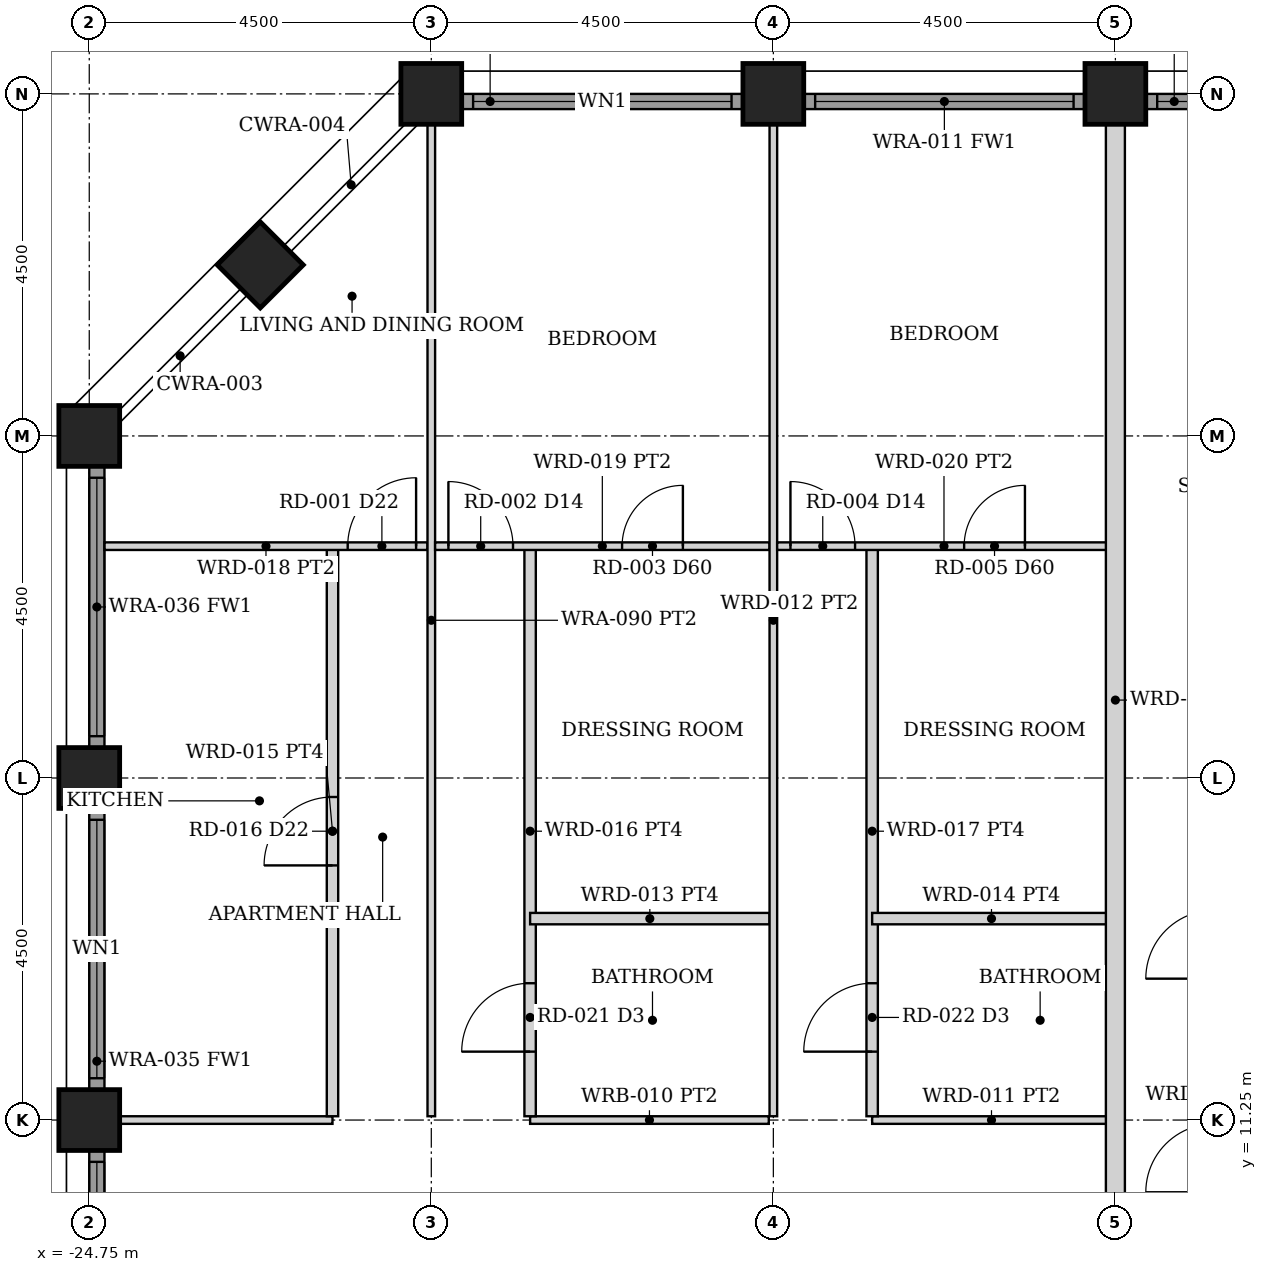
"""IFC4 building model, lengths in metres.
Left out: names, types, materials, properties, quantities, classifications, styles, units other than length and angle.
Written with IfcOpenShell. Run it as: python <this file> out.ifc"""

import sys

from ifc_helpers import new_model, si_unit, direction, frame, frame_2d, origin, origin_2d, place, context, subcontext, project, spatial, rectangle, hollow_rectangle, extrude, element, fill, save


model = new_model("IFC4")
c1 = context("Model", 3, precision=1e-05, world=origin(), true_north=direction((0.0, 1.0)))
c2 = subcontext(c1, "Body", "Model", "MODEL_VIEW")
j1 = project(units=[si_unit("LENGTHUNIT", "METRE"), si_unit("PLANEANGLEUNIT", "RADIAN")], contexts=[c1])
p1 = place(None, origin())
s1 = spatial("IfcSite", under=j1, at=p1, CompositionType="ELEMENT")
p2 = place(p1, origin())
s2 = spatial("IfcBuilding", under=s1, at=p2, CompositionType="ELEMENT")
p3 = place(p2, frame((0.0, 0.0, 58.0)))
s3 = spatial("IfcBuildingStorey", under=s2, at=p3, CompositionType="ELEMENT", Elevation=58.0)
for number, where, z_axis, x_axis in (
    (1, (-20.25, 24.75, 0.0), (0.0, 0.0, 1.0), (0.0, 1.0, 0.0)),
    (2, (-15.75, 24.75, 0.0), (0.0, 0.0, 1.0), (0.0, 1.0, 0.0)),
    (3, (-11.25, 24.75, 0.0), (0.0, 0.0, 1.0), (0.0, 1.0, 0.0)),
    (4, (-24.75, 11.25, 0.0), (0.0, 0.0, 1.0), (1.0, 0.0, 0.0)),
    (5, (-24.75, 15.75, 0.0), (0.0, 0.0, 1.0), (1.0, 0.0, 0.0)),
    (6, (-24.75, 20.25, 0.0), (0.0, 0.0, 1.0), (1.0, 0.0, 0.0)),
    (7, (-22.5, 22.5, 0.0), (0.0, 0.0, 1.0), (0.707, -0.707, 0.0)),
):
    element("IfcColumn", number, at=place(p3, frame(where, z_axis=z_axis, x_axis=x_axis)), inside=s3, PredefinedType="COLUMN", context=c2, shape_type="SweptSolid", body=[
        extrude(hollow_rectangle(XDim=0.8, YDim=0.8, WallThickness=0.06, at=origin_2d()), origin(), (0.0, 0.0, 1.0), 3.5),
    ])
p4 = place(p3, frame((-19.845, 24.65, 0.0), z_axis=(0.0, 0.0, 1.0), x_axis=(1.0, 0.0, 0.0)))
e8 = element("IfcWall", 8, at=p4, inside=s3, PredefinedType="SOLIDWALL", context=c2, shape_type="SweptSolid", body=[
    extrude(rectangle(XDim=3.69, YDim=0.2, at=frame_2d((1.845, 0.0))), origin(), (0.0, 0.0, 1.0), 2.379),
])
p5 = place(p4, frame((0.145, 0.0, 0.3)))
e9 = element("IfcOpeningElement", 9, at=p5, cuts=e8, PredefinedType="OPENING", context=c2, shape_type="SweptSolid", body=[
    extrude(rectangle(XDim=3.4, YDim=1.929, at=frame_2d((1.7, 0.964))), frame((0.0, 0.11, 0.0), z_axis=(0.0, -1.0, 0.0), x_axis=(1.0, 0.0, 0.0)), (0.0, 0.0, 1.0), 0.22),
])
p6 = place(p3, frame((-15.345, 24.65, 0.0), z_axis=(0.0, 0.0, 1.0), x_axis=(1.0, 0.0, 0.0)))
e10 = element("IfcWall", 10, at=p6, inside=s3, PredefinedType="SOLIDWALL", context=c2, shape_type="SweptSolid", body=[
    extrude(rectangle(XDim=3.69, YDim=0.2, at=frame_2d((1.845, 0.0))), origin(), (0.0, 0.0, 1.0), 2.379),
])
p7 = place(p6, frame((0.145, 0.0, 0.3)))
e11 = element("IfcOpeningElement", 11, at=p7, cuts=e10, PredefinedType="OPENING", context=c2, shape_type="SweptSolid", body=[
    extrude(rectangle(XDim=3.4, YDim=1.929, at=frame_2d((1.7, 0.964))), frame((0.0, 0.11, 0.0), z_axis=(0.0, -1.0, 0.0), x_axis=(1.0, 0.0, 0.0)), (0.0, 0.0, 1.0), 0.22),
])
p8 = place(p3, frame((-10.845, 24.65, 0.0), z_axis=(0.0, 0.0, 1.0), x_axis=(1.0, 0.0, 0.0)))
e12 = element("IfcWall", 12, at=p8, inside=s3, PredefinedType="SOLIDWALL", context=c2, shape_type="SweptSolid", body=[
    extrude(rectangle(XDim=3.69, YDim=0.2, at=frame_2d((1.845, 0.0))), origin(), (0.0, 0.0, 1.0), 2.379),
])
p9 = place(p8, frame((0.145, 0.0, 0.3)))
e13 = element("IfcOpeningElement", 13, at=p9, cuts=e12, PredefinedType="OPENING", context=c2, shape_type="SweptSolid", body=[
    extrude(rectangle(XDim=3.4, YDim=1.929, at=frame_2d((1.7, 0.964))), frame((0.0, 0.11, 0.0), z_axis=(0.0, -1.0, 0.0), x_axis=(1.0, 0.0, 0.0)), (0.0, 0.0, 1.0), 0.22),
])
p10 = place(p3, frame((-24.65, 7.155, 0.0), z_axis=(0.0, 0.0, 1.0), x_axis=(0.0, 1.0, 0.0)))
e14 = element("IfcWall", 14, at=p10, inside=s3, PredefinedType="SOLIDWALL", context=c2, shape_type="SweptSolid", body=[
    extrude(rectangle(XDim=3.69, YDim=0.2, at=frame_2d((1.845, 0.0))), origin(), (0.0, 0.0, 1.0), 2.379),
])
p11 = place(p10, frame((0.145, 0.0, 0.3)))
e15 = element("IfcOpeningElement", 15, at=p11, cuts=e14, PredefinedType="OPENING", context=c2, shape_type="SweptSolid", body=[
    extrude(rectangle(XDim=3.4, YDim=1.929, at=frame_2d((1.7, 0.964))), frame((0.0, 0.11, 0.0), z_axis=(0.0, -1.0, 0.0), x_axis=(1.0, 0.0, 0.0)), (0.0, 0.0, 1.0), 0.22),
])
p12 = place(p3, frame((-24.65, 11.655, 0.0), z_axis=(0.0, 0.0, 1.0), x_axis=(0.0, 1.0, 0.0)))
e16 = element("IfcWall", 16, at=p12, inside=s3, PredefinedType="SOLIDWALL", context=c2, shape_type="SweptSolid", body=[
    extrude(rectangle(XDim=3.69, YDim=0.2, at=frame_2d((1.845, 0.0))), origin(), (0.0, 0.0, 1.0), 2.379),
])
p13 = place(p12, frame((0.145, 0.0, 0.3)))
e17 = element("IfcOpeningElement", 17, at=p13, cuts=e16, PredefinedType="OPENING", context=c2, shape_type="SweptSolid", body=[
    extrude(rectangle(XDim=3.4, YDim=1.929, at=frame_2d((1.7, 0.964))), frame((0.0, 0.11, 0.0), z_axis=(0.0, -1.0, 0.0), x_axis=(1.0, 0.0, 0.0)), (0.0, 0.0, 1.0), 0.22),
])
p14 = place(p3, frame((-24.65, 16.155, 0.0), z_axis=(0.0, 0.0, 1.0), x_axis=(0.0, 1.0, 0.0)))
e18 = element("IfcWall", 18, at=p14, inside=s3, PredefinedType="SOLIDWALL", context=c2, shape_type="SweptSolid", body=[
    extrude(rectangle(XDim=3.69, YDim=0.2, at=frame_2d((1.845, 0.0))), origin(), (0.0, 0.0, 1.0), 2.379),
])
p15 = place(p14, frame((0.145, 0.0, 0.3)))
e19 = element("IfcOpeningElement", 19, at=p15, cuts=e18, PredefinedType="OPENING", context=c2, shape_type="SweptSolid", body=[
    extrude(rectangle(XDim=3.4, YDim=1.929, at=frame_2d((1.7, 0.964))), frame((0.0, 0.11, 0.0), z_axis=(0.0, -1.0, 0.0), x_axis=(1.0, 0.0, 0.0)), (0.0, 0.0, 1.0), 0.22),
])
p16 = place(p3, frame((-24.35, 11.25, 0.0), z_axis=(0.0, 0.0, 1.0), x_axis=(1.0, 0.0, 0.0)))
e20 = element("IfcWall", 20, at=p16, inside=s3, PredefinedType="PARTITIONING", context=c2, shape_type="SweptSolid", body=[
    extrude(rectangle(XDim=2.8, YDim=0.1, at=frame_2d((1.4, 0.0))), origin(), (0.0, 0.0, 1.0), 2.373),
])
p17 = place(p3, frame((-21.55, 11.3, 0.0), z_axis=(0.0, 0.0, 1.0), x_axis=(0.0, 1.0, 0.0)))
e21 = element("IfcWall", 21, at=p17, inside=s3, PredefinedType="PARTITIONING", context=c2, shape_type="SweptSolid", body=[
    extrude(rectangle(XDim=7.5, YDim=0.15, at=frame_2d((3.75, 0.0))), origin(), (0.0, 0.0, 1.0), 2.373),
])
p18 = place(p17, frame((3.3, 0.0, 0.0)))
e22 = element("IfcOpeningElement", 22, at=p18, cuts=e21, PredefinedType="OPENING", context=c2, shape_type="SweptSolid", body=[
    extrude(rectangle(XDim=0.9, YDim=2.1, at=frame_2d((0.45, 1.05))), frame((0.0, 0.085, 0.0), z_axis=(0.0, -1.0, 0.0), x_axis=(1.0, 0.0, 0.0)), (0.0, 0.0, 1.0), 0.17),
])
p19 = place(p3, frame((-24.55, 18.8, 0.0), z_axis=(0.0, 0.0, 1.0), x_axis=(1.0, 0.0, 0.0)))
e23 = element("IfcWall", 23, at=p19, inside=s3, PredefinedType="PARTITIONING", context=c2, shape_type="SweptSolid", body=[
    extrude(rectangle(XDim=4.25, YDim=0.1, at=frame_2d((2.125, 0.0))), origin(), (0.0, 0.0, 1.0), 2.373),
])
p20 = place(p19, frame((3.2, 0.0, 0.0)))
e24 = element("IfcOpeningElement", 24, at=p20, cuts=e23, PredefinedType="OPENING", context=c2, shape_type="SweptSolid", body=[
    extrude(rectangle(XDim=0.9, YDim=2.1, at=frame_2d((0.45, 1.05))), frame((0.0, 0.06, 0.0), z_axis=(0.0, -1.0, 0.0), x_axis=(1.0, 0.0, 0.0)), (0.0, 0.0, 1.0), 0.12),
])
p21 = place(p3, frame((-20.25, 11.3, 0.0), z_axis=(0.0, 0.0, 1.0), x_axis=(0.0, 1.0, 0.0)))
e25 = element("IfcWall", 25, at=p21, inside=s3, PredefinedType="PARTITIONING", context=c2, shape_type="SweptSolid", body=[
    extrude(rectangle(XDim=13.05, YDim=0.1, at=frame_2d((6.525, 0.0))), origin(), (0.0, 0.0, 1.0), 2.373),
])
p22 = place(p3, frame((-18.95, 11.25, 0.0), z_axis=(0.0, 0.0, 1.0), x_axis=(1.0, 0.0, 0.0)))
e26 = element("IfcWall", 26, at=p22, inside=s3, PredefinedType="PARTITIONING", context=c2, shape_type="SweptSolid", body=[
    extrude(rectangle(XDim=3.14, YDim=0.1, at=frame_2d((1.57, 0.0))), origin(), (0.0, 0.0, 1.0), 2.373),
])
p23 = place(p3, frame((-18.95, 11.3, 0.0), z_axis=(0.0, 0.0, 1.0), x_axis=(0.0, 1.0, 0.0)))
e27 = element("IfcWall", 27, at=p23, inside=s3, PredefinedType="PARTITIONING", context=c2, shape_type="SweptSolid", body=[
    extrude(rectangle(XDim=7.5, YDim=0.15, at=frame_2d((3.75, 0.0))), origin(), (0.0, 0.0, 1.0), 2.373),
])
p24 = place(p23, frame((0.85, 0.0, 0.0)))
e28 = element("IfcOpeningElement", 28, at=p24, cuts=e27, PredefinedType="OPENING", context=c2, shape_type="SweptSolid", body=[
    extrude(rectangle(XDim=0.9, YDim=2.1, at=frame_2d((0.45, 1.05))), frame((0.0, 0.085, 0.0), z_axis=(0.0, -1.0, 0.0), x_axis=(1.0, 0.0, 0.0)), (0.0, 0.0, 1.0), 0.17),
])
p25 = place(p3, frame((-20.2, 18.8, 0.0), z_axis=(0.0, 0.0, 1.0), x_axis=(1.0, 0.0, 0.0)))
e29 = element("IfcWall", 29, at=p25, inside=s3, PredefinedType="PARTITIONING", context=c2, shape_type="SweptSolid", body=[
    extrude(rectangle(XDim=4.4, YDim=0.1, at=frame_2d((2.2, 0.0))), origin(), (0.0, 0.0, 1.0), 2.373),
])
p26 = place(p25, frame((0.175, 0.0, 0.0)))
e30 = element("IfcOpeningElement", 30, at=p26, cuts=e29, PredefinedType="OPENING", context=c2, shape_type="SweptSolid", body=[
    extrude(rectangle(XDim=0.85, YDim=2.1, at=frame_2d((0.425, 1.05))), frame((0.0, 0.06, 0.0), z_axis=(0.0, -1.0, 0.0), x_axis=(1.0, 0.0, 0.0)), (0.0, 0.0, 1.0), 0.12),
])
p27 = place(p25, frame((2.46, 0.0, 0.0)))
e31 = element("IfcOpeningElement", 31, at=p27, cuts=e29, PredefinedType="OPENING", context=c2, shape_type="SweptSolid", body=[
    extrude(rectangle(XDim=0.8, YDim=2.1, at=frame_2d((0.4, 1.05))), frame((0.0, 0.06, 0.0), z_axis=(0.0, -1.0, 0.0), x_axis=(1.0, 0.0, 0.0)), (0.0, 0.0, 1.0), 0.12),
])
p28 = place(p3, frame((-18.95, 13.9, 0.0), z_axis=(0.0, 0.0, 1.0), x_axis=(1.0, 0.0, 0.0)))
e32 = element("IfcWall", 32, at=p28, inside=s3, PredefinedType="PARTITIONING", context=c2, shape_type="SweptSolid", body=[
    extrude(rectangle(XDim=3.15, YDim=0.15, at=frame_2d((1.575, 0.0))), origin(), (0.0, 0.0, 1.0), 2.373),
])
p29 = place(p3, frame((-15.75, 11.3, 0.0), z_axis=(0.0, 0.0, 1.0), x_axis=(0.0, 1.0, 0.0)))
e33 = element("IfcWall", 33, at=p29, inside=s3, PredefinedType="PARTITIONING", context=c2, shape_type="SweptSolid", body=[
    extrude(rectangle(XDim=13.05, YDim=0.1, at=frame_2d((6.525, 0.0))), origin(), (0.0, 0.0, 1.0), 2.373),
])
p30 = place(p3, frame((-14.45, 11.25, 0.0), z_axis=(0.0, 0.0, 1.0), x_axis=(1.0, 0.0, 0.0)))
e34 = element("IfcWall", 34, at=p30, inside=s3, PredefinedType="PARTITIONING", context=c2, shape_type="SweptSolid", body=[
    extrude(rectangle(XDim=3.14, YDim=0.1, at=frame_2d((1.57, 0.0))), origin(), (0.0, 0.0, 1.0), 2.373),
])
p31 = place(p3, frame((-14.45, 11.3, 0.0), z_axis=(0.0, 0.0, 1.0), x_axis=(0.0, 1.0, 0.0)))
e35 = element("IfcWall", 35, at=p31, inside=s3, PredefinedType="PARTITIONING", context=c2, shape_type="SweptSolid", body=[
    extrude(rectangle(XDim=7.5, YDim=0.15, at=frame_2d((3.75, 0.0))), origin(), (0.0, 0.0, 1.0), 2.373),
])
p32 = place(p31, frame((0.85, 0.0, 0.0)))
e36 = element("IfcOpeningElement", 36, at=p32, cuts=e35, PredefinedType="OPENING", context=c2, shape_type="SweptSolid", body=[
    extrude(rectangle(XDim=0.9, YDim=2.1, at=frame_2d((0.45, 1.05))), frame((0.0, 0.085, 0.0), z_axis=(0.0, -1.0, 0.0), x_axis=(1.0, 0.0, 0.0)), (0.0, 0.0, 1.0), 0.17),
])
p33 = place(p3, frame((-15.7, 18.8, 0.0), z_axis=(0.0, 0.0, 1.0), x_axis=(1.0, 0.0, 0.0)))
e37 = element("IfcWall", 37, at=p33, inside=s3, PredefinedType="PARTITIONING", context=c2, shape_type="SweptSolid", body=[
    extrude(rectangle(XDim=4.39, YDim=0.1, at=frame_2d((2.195, 0.0))), origin(), (0.0, 0.0, 1.0), 2.373),
])
p34 = place(p33, frame((0.175, 0.0, 0.0)))
e38 = element("IfcOpeningElement", 38, at=p34, cuts=e37, PredefinedType="OPENING", context=c2, shape_type="SweptSolid", body=[
    extrude(rectangle(XDim=0.85, YDim=2.1, at=frame_2d((0.425, 1.05))), frame((0.0, 0.06, 0.0), z_axis=(0.0, -1.0, 0.0), x_axis=(1.0, 0.0, 0.0)), (0.0, 0.0, 1.0), 0.12),
])
p35 = place(p33, frame((2.46, 0.0, 0.0)))
e39 = element("IfcOpeningElement", 39, at=p35, cuts=e37, PredefinedType="OPENING", context=c2, shape_type="SweptSolid", body=[
    extrude(rectangle(XDim=0.8, YDim=2.1, at=frame_2d((0.4, 1.05))), frame((0.0, 0.06, 0.0), z_axis=(0.0, -1.0, 0.0), x_axis=(1.0, 0.0, 0.0)), (0.0, 0.0, 1.0), 0.12),
])
p36 = place(p3, frame((-14.45, 13.9, 0.0), z_axis=(0.0, 0.0, 1.0), x_axis=(1.0, 0.0, 0.0)))
e40 = element("IfcWall", 40, at=p36, inside=s3, PredefinedType="PARTITIONING", context=c2, shape_type="SweptSolid", body=[
    extrude(rectangle(XDim=3.14, YDim=0.15, at=frame_2d((1.57, 0.0))), origin(), (0.0, 0.0, 1.0), 2.373),
])
p37 = place(p3, frame((-11.25, 9.2, 0.0), z_axis=(0.0, 0.0, 1.0), x_axis=(0.0, 1.0, 0.0)))
e41 = element("IfcWall", 41, at=p37, inside=s3, PredefinedType="PARTITIONING", context=c2, shape_type="SweptSolid", body=[
    extrude(rectangle(XDim=15.15, YDim=0.25, at=frame_2d((7.575, 0.0))), origin(), (0.0, 0.0, 1.0), 2.373),
])
p38 = place(p5, origin())
e42 = element("IfcWindow", 42, at=p38, inside=s3, PartitioningType="SINGLE_PANEL", PredefinedType="WINDOW", context=c2, shape_type="SweptSolid", body=[
    extrude(rectangle(XDim=3.4, YDim=1.929, at=frame_2d((1.7, 0.964))), frame((0.0, 0.03, 0.0), z_axis=(0.0, -1.0, 0.0), x_axis=(1.0, 0.0, 0.0)), (0.0, 0.0, 1.0), 0.06),
])
fill(e9, e42)
p39 = place(p7, origin())
e43 = element("IfcWindow", 43, at=p39, inside=s3, PartitioningType="SINGLE_PANEL", PredefinedType="WINDOW", context=c2, shape_type="SweptSolid", body=[
    extrude(rectangle(XDim=3.4, YDim=1.929, at=frame_2d((1.7, 0.964))), frame((0.0, 0.03, 0.0), z_axis=(0.0, -1.0, 0.0), x_axis=(1.0, 0.0, 0.0)), (0.0, 0.0, 1.0), 0.06),
])
fill(e11, e43)
p40 = place(p9, origin())
e44 = element("IfcWindow", 44, at=p40, inside=s3, PartitioningType="SINGLE_PANEL", PredefinedType="WINDOW", context=c2, shape_type="SweptSolid", body=[
    extrude(rectangle(XDim=3.4, YDim=1.929, at=frame_2d((1.7, 0.964))), frame((0.0, 0.03, 0.0), z_axis=(0.0, -1.0, 0.0), x_axis=(1.0, 0.0, 0.0)), (0.0, 0.0, 1.0), 0.06),
])
fill(e13, e44)
p41 = place(p11, origin())
e45 = element("IfcWindow", 45, at=p41, inside=s3, PartitioningType="SINGLE_PANEL", PredefinedType="WINDOW", context=c2, shape_type="SweptSolid", body=[
    extrude(rectangle(XDim=3.4, YDim=1.929, at=frame_2d((1.7, 0.964))), frame((0.0, 0.03, 0.0), z_axis=(0.0, -1.0, 0.0), x_axis=(1.0, 0.0, 0.0)), (0.0, 0.0, 1.0), 0.06),
])
fill(e15, e45)
p42 = place(p13, origin())
e46 = element("IfcWindow", 46, at=p42, inside=s3, PartitioningType="SINGLE_PANEL", PredefinedType="WINDOW", context=c2, shape_type="SweptSolid", body=[
    extrude(rectangle(XDim=3.4, YDim=1.929, at=frame_2d((1.7, 0.964))), frame((0.0, 0.03, 0.0), z_axis=(0.0, -1.0, 0.0), x_axis=(1.0, 0.0, 0.0)), (0.0, 0.0, 1.0), 0.06),
])
fill(e17, e46)
p43 = place(p15, origin())
e47 = element("IfcWindow", 47, at=p43, inside=s3, PartitioningType="SINGLE_PANEL", PredefinedType="WINDOW", context=c2, shape_type="SweptSolid", body=[
    extrude(rectangle(XDim=3.4, YDim=1.929, at=frame_2d((1.7, 0.964))), frame((0.0, 0.03, 0.0), z_axis=(0.0, -1.0, 0.0), x_axis=(1.0, 0.0, 0.0)), (0.0, 0.0, 1.0), 0.06),
])
fill(e19, e47)
p44 = place(p18, origin())
e48 = element("IfcDoor", 48, at=p44, inside=s3, OperationType="SINGLE_SWING_LEFT", PredefinedType="DOOR", context=c2, shape_type="SweptSolid", body=[
    extrude(rectangle(XDim=0.9, YDim=2.1, at=frame_2d((0.45, 1.05))), frame((0.0, 0.025, 0.0), z_axis=(0.0, -1.0, 0.0), x_axis=(1.0, 0.0, 0.0)), (0.0, 0.0, 1.0), 0.05),
])
fill(e22, e48)
p45 = place(p20, origin())
e49 = element("IfcDoor", 49, at=p45, inside=s3, OperationType="SINGLE_SWING_RIGHT", PredefinedType="DOOR", context=c2, shape_type="SweptSolid", body=[
    extrude(rectangle(XDim=0.9, YDim=2.1, at=frame_2d((0.45, 1.05))), frame((0.0, 0.025, 0.0), z_axis=(0.0, -1.0, 0.0), x_axis=(1.0, 0.0, 0.0)), (0.0, 0.0, 1.0), 0.05),
])
fill(e24, e49)
p46 = place(p26, origin())
e50 = element("IfcDoor", 50, at=p46, inside=s3, OperationType="SINGLE_SWING_LEFT", PredefinedType="DOOR", context=c2, shape_type="SweptSolid", body=[
    extrude(rectangle(XDim=0.85, YDim=2.1, at=frame_2d((0.425, 1.05))), frame((0.0, 0.025, 0.0), z_axis=(0.0, -1.0, 0.0), x_axis=(1.0, 0.0, 0.0)), (0.0, 0.0, 1.0), 0.05),
])
fill(e30, e50)
p47 = place(p24, origin())
e51 = element("IfcDoor", 51, at=p47, inside=s3, OperationType="SINGLE_SWING_LEFT", PredefinedType="DOOR", context=c2, shape_type="SweptSolid", body=[
    extrude(rectangle(XDim=0.9, YDim=2.1, at=frame_2d((0.45, 1.05))), frame((0.0, 0.025, 0.0), z_axis=(0.0, -1.0, 0.0), x_axis=(1.0, 0.0, 0.0)), (0.0, 0.0, 1.0), 0.05),
])
fill(e28, e51)
p48 = place(p27, origin())
e52 = element("IfcDoor", 52, at=p48, inside=s3, OperationType="SINGLE_SWING_RIGHT", PredefinedType="DOOR", context=c2, shape_type="SweptSolid", body=[
    extrude(rectangle(XDim=0.8, YDim=2.1, at=frame_2d((0.4, 1.05))), frame((0.0, 0.025, 0.0), z_axis=(0.0, -1.0, 0.0), x_axis=(1.0, 0.0, 0.0)), (0.0, 0.0, 1.0), 0.05),
])
fill(e31, e52)
p49 = place(p34, origin())
e53 = element("IfcDoor", 53, at=p49, inside=s3, OperationType="SINGLE_SWING_LEFT", PredefinedType="DOOR", context=c2, shape_type="SweptSolid", body=[
    extrude(rectangle(XDim=0.85, YDim=2.1, at=frame_2d((0.425, 1.05))), frame((0.0, 0.025, 0.0), z_axis=(0.0, -1.0, 0.0), x_axis=(1.0, 0.0, 0.0)), (0.0, 0.0, 1.0), 0.05),
])
fill(e38, e53)
p50 = place(p32, origin())
e54 = element("IfcDoor", 54, at=p50, inside=s3, OperationType="SINGLE_SWING_LEFT", PredefinedType="DOOR", context=c2, shape_type="SweptSolid", body=[
    extrude(rectangle(XDim=0.9, YDim=2.1, at=frame_2d((0.45, 1.05))), frame((0.0, 0.025, 0.0), z_axis=(0.0, -1.0, 0.0), x_axis=(1.0, 0.0, 0.0)), (0.0, 0.0, 1.0), 0.05),
])
fill(e36, e54)
p51 = place(p35, origin())
e55 = element("IfcDoor", 55, at=p51, inside=s3, OperationType="SINGLE_SWING_RIGHT", PredefinedType="DOOR", context=c2, shape_type="SweptSolid", body=[
    extrude(rectangle(XDim=0.8, YDim=2.1, at=frame_2d((0.4, 1.05))), frame((0.0, 0.025, 0.0), z_axis=(0.0, -1.0, 0.0), x_axis=(1.0, 0.0, 0.0)), (0.0, 0.0, 1.0), 0.05),
])
fill(e39, e55)
save(model, sys.argv[1])
